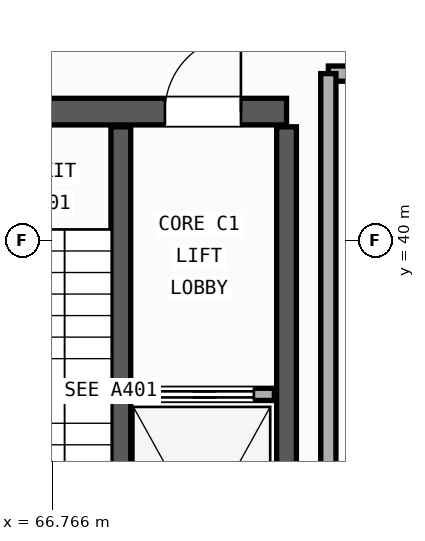
"""IFC4 building model, lengths in metres.
Left out: names, types, materials, properties, quantities, classifications, styles, units other than length and angle.
Written with IfcOpenShell. Run it as: python <this file> out.ifc"""

import sys

from ifc_helpers import new_model, si_unit, direction, frame, frame_2d, origin, place, context, subcontext, project, spatial, rectangle, extrude, element, fill, save


model = new_model("IFC4")
c1 = context("Model", 3, precision=1e-05, world=origin(), true_north=direction((0.0, 1.0)))
c2 = subcontext(c1, "Body", "Model", "MODEL_VIEW")
j1 = project(units=[si_unit("LENGTHUNIT", "METRE"), si_unit("PLANEANGLEUNIT", "RADIAN")], contexts=[c1])
p1 = place(None, origin())
s1 = spatial("IfcSite", under=j1, at=p1, CompositionType="ELEMENT")
p2 = place(p1, origin())
s2 = spatial("IfcBuilding", under=s1, at=p2, CompositionType="ELEMENT")
p3 = place(p2, origin())
s3 = spatial("IfcBuildingStorey", under=s2, at=p3, CompositionType="ELEMENT", Elevation=0.0)
p4 = place(p3, frame((64.45, 41.7, 0.0), z_axis=(0.0, 0.0, 1.0), x_axis=(1.0, 0.0, 0.0)))
e1 = element("IfcWall", 1, at=p4, inside=s3, PredefinedType="SHEAR", context=c2, shape_type="SweptSolid", body=[
    extrude(rectangle(XDim=5.4, YDim=0.35, at=frame_2d((2.7, 0.0))), origin(), (0.0, 0.0, 1.0), 5.07),
])
p5 = place(p4, frame((0.95, 0.0, 0.0)))
e2 = element("IfcOpeningElement", 2, at=p5, cuts=e1, PredefinedType="OPENING", context=c2, shape_type="SweptSolid", body=[
    extrude(rectangle(XDim=1.05, YDim=2.1, at=frame_2d((0.525, 1.05))), frame((0.0, 0.185, 0.0), z_axis=(0.0, -1.0, 0.0), x_axis=(1.0, 0.0, 0.0)), (0.0, 0.0, 1.0), 0.37),
])
p6 = place(p4, frame((3.8, 0.0, 0.0)))
e3 = element("IfcOpeningElement", 3, at=p6, cuts=e1, PredefinedType="OPENING", context=c2, shape_type="SweptSolid", body=[
    extrude(rectangle(XDim=1.0, YDim=2.15, at=frame_2d((0.5, 1.075))), frame((0.0, 0.185, 0.0), z_axis=(0.0, -1.0, 0.0), x_axis=(1.0, 0.0, 0.0)), (0.0, 0.0, 1.0), 0.37),
])
for number, where, z_axis, x_axis in (
    (4, (69.85, 34.55, 0.0), (0.0, 0.0, 1.0), (0.0, 1.0, 0.0)),
    (5, (67.67, 34.55, 0.0), (0.0, 0.0, 1.0), (0.0, 1.0, 0.0)),
):
    element("IfcWall", number, at=place(p3, frame(where, z_axis=z_axis, x_axis=x_axis)), inside=s3, PredefinedType="SHEAR", context=c2, shape_type="SweptSolid", body=[
        extrude(rectangle(XDim=6.95, YDim=0.26, at=frame_2d((3.475, 0.0))), origin(), (0.0, 0.0, 1.0), 5.07),
    ])
p7 = place(p3, frame((67.85, 37.98, 0.0), z_axis=(0.0, 0.0, 1.0), x_axis=(1.0, 0.0, 0.0)))
e6 = element("IfcWall", 6, at=p7, inside=s3, PredefinedType="PARTITIONING", context=c2, shape_type="SweptSolid", body=[
    extrude(rectangle(XDim=1.84, YDim=0.16, at=frame_2d((0.92, 0.0))), origin(), (0.0, 0.0, 1.0), 3.6),
])
p8 = place(p7, frame((0.27, 0.0, 0.0)))
e7 = element("IfcOpeningElement", 7, at=p8, cuts=e6, PredefinedType="OPENING", context=c2, shape_type="SweptSolid", body=[
    extrude(rectangle(XDim=1.3, YDim=2.2, at=frame_2d((0.65, 1.1))), frame((0.0, 0.09, 0.0), z_axis=(0.0, -1.0, 0.0), x_axis=(1.0, 0.0, 0.0)), (0.0, 0.0, 1.0), 0.18),
])
p9 = place(p3, frame((70.4, 42.2, 0.0), z_axis=(0.0, 0.0, 1.0), x_axis=(1.0, 0.0, 0.0)))
e8 = element("IfcWall", 8, at=p9, inside=s3, PredefinedType="PLUMBINGWALL", context=c2, shape_type="SweptSolid", body=[
    extrude(rectangle(XDim=4.6, YDim=0.2, at=frame_2d((2.3, 0.0))), origin(), (0.0, 0.0, 1.0), 4.29),
])
p10 = place(p9, frame((1.845, 0.0, 0.0)))
e9 = element("IfcOpeningElement", 9, at=p10, cuts=e8, PredefinedType="OPENING", context=c2, shape_type="SweptSolid", body=[
    extrude(rectangle(XDim=0.91, YDim=2.1, at=frame_2d((0.455, 1.05))), frame((0.0, 0.11, 0.0), z_axis=(0.0, -1.0, 0.0), x_axis=(1.0, 0.0, 0.0)), (0.0, 0.0, 1.0), 0.22),
])
p11 = place(p3, frame((70.4, 31.8, 0.0), z_axis=(0.0, 0.0, 1.0), x_axis=(0.0, 1.0, 0.0)))
e10 = element("IfcWall", 10, at=p11, inside=s3, PredefinedType="PLUMBINGWALL", context=c2, shape_type="SweptSolid", body=[
    extrude(rectangle(XDim=10.4, YDim=0.2, at=frame_2d((5.2, 0.0))), origin(), (0.0, 0.0, 1.0), 4.29),
])
p12 = place(p8, origin())
e11 = element("IfcDoor", 11, at=p12, inside=s3, OperationType="SLIDING_TO_LEFT", PredefinedType="DOOR", context=c2, shape_type="SweptSolid", body=[
    extrude(rectangle(XDim=1.3, YDim=2.2, at=frame_2d((0.65, 1.1))), frame((0.0, 0.025, 0.0), z_axis=(0.0, -1.0, 0.0), x_axis=(1.0, 0.0, 0.0)), (0.0, 0.0, 1.0), 0.05),
])
fill(e7, e11)
p13 = place(p6, origin())
e12 = element("IfcDoor", 12, at=p13, inside=s3, OperationType="SINGLE_SWING_RIGHT", PredefinedType="DOOR", context=c2, shape_type="SweptSolid", body=[
    extrude(rectangle(XDim=1.0, YDim=2.15, at=frame_2d((0.5, 1.075))), frame((0.0, 0.025, 0.0), z_axis=(0.0, -1.0, 0.0), x_axis=(1.0, 0.0, 0.0)), (0.0, 0.0, 1.0), 0.05),
])
fill(e3, e12)
save(model, sys.argv[1])
